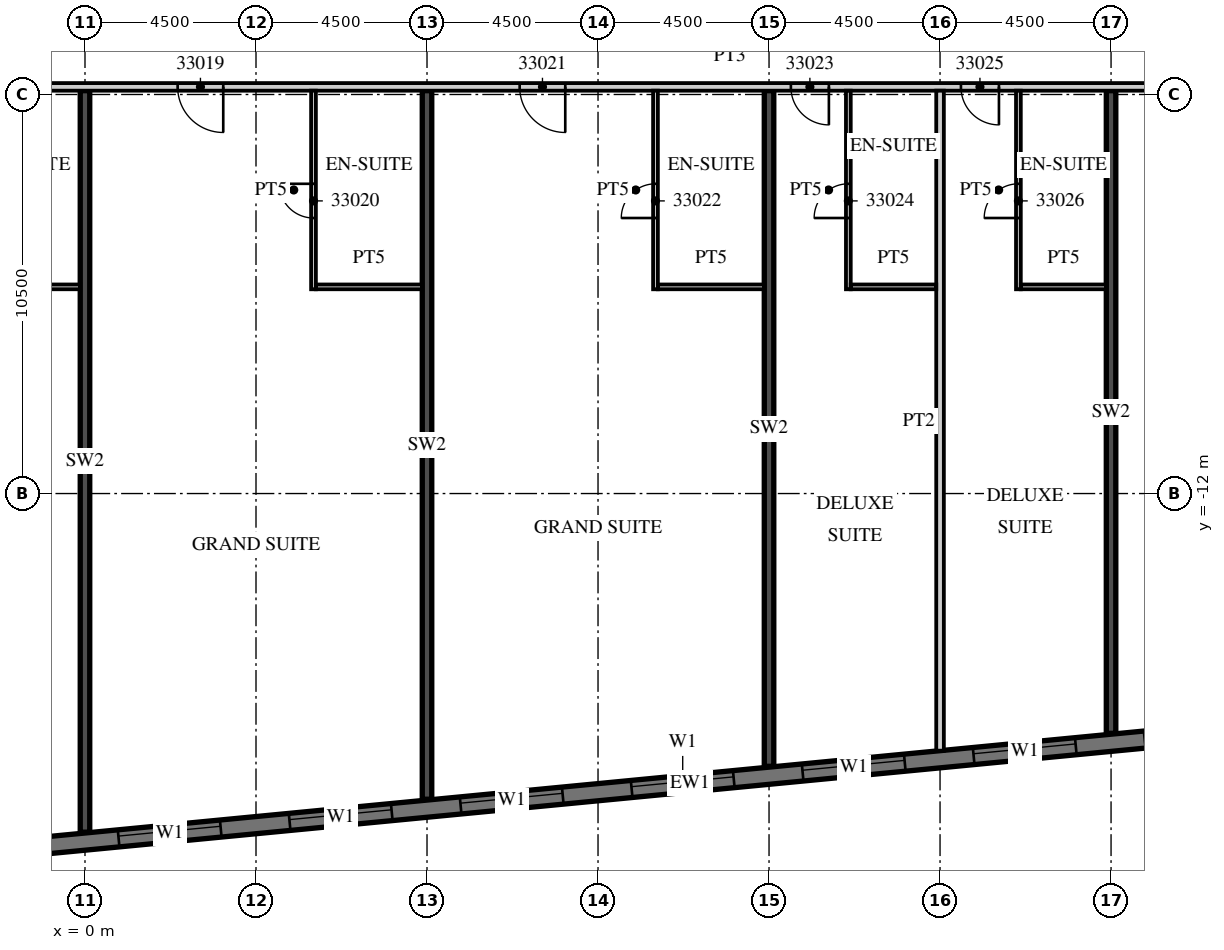
"""IFC4 building model, lengths in metres.
Left out: names, types, materials, properties, quantities, classifications, styles, units other than length and angle.
Written with IfcOpenShell. Run it as: python <this file> out.ifc"""

import sys

from ifc_helpers import new_model, si_unit, direction, frame, frame_2d, origin, place, context, subcontext, project, spatial, rectangle, extrude, element, fill, save


model = new_model("IFC4")
c1 = context("Model", 3, precision=1e-05, world=origin(), true_north=direction((0.0, 1.0)))
c2 = subcontext(c1, "Body", "Model", "MODEL_VIEW")
j1 = project(units=[si_unit("LENGTHUNIT", "METRE"), si_unit("PLANEANGLEUNIT", "RADIAN")], contexts=[c1])
p1 = place(None, origin())
s1 = spatial("IfcSite", under=j1, at=p1, CompositionType="ELEMENT")
p2 = place(p1, origin())
s2 = spatial("IfcBuilding", under=s1, at=p2, CompositionType="ELEMENT")
p3 = place(p2, frame((0.0, 0.0, 143.8)))
s3 = spatial("IfcBuildingStorey", under=s2, at=p3, CompositionType="ELEMENT", Elevation=143.8)
p4 = place(p3, frame((0.0, -20.91, 0.0), z_axis=(0.0, 0.0, 1.0), x_axis=(0.0, 1.0, 0.0)))
e1 = element("IfcWall", 1, at=p4, inside=s3, PredefinedType="SHEAR", context=c2, shape_type="SweptSolid", body=[
    extrude(rectangle(XDim=19.51, YDim=0.25, at=frame_2d((9.755, 0.0))), origin(), (0.0, 0.0, 1.0), 3.3),
])
p5 = place(p3, frame((9.0, -20.044, 0.0), z_axis=(0.0, 0.0, 1.0), x_axis=(0.0, 1.0, 0.0)))
e2 = element("IfcWall", 2, at=p5, inside=s3, PredefinedType="SHEAR", context=c2, shape_type="SweptSolid", body=[
    extrude(rectangle(XDim=18.644, YDim=0.25, at=frame_2d((9.322, 0.0))), origin(), (0.0, 0.0, 1.0), 3.3),
])
p6 = place(p3, frame((18.0, -19.177, 0.0), z_axis=(0.0, 0.0, 1.0), x_axis=(0.0, 1.0, 0.0)))
e3 = element("IfcWall", 3, at=p6, inside=s3, PredefinedType="SHEAR", context=c2, shape_type="SweptSolid", body=[
    extrude(rectangle(XDim=17.777, YDim=0.25, at=frame_2d((8.889, 0.0))), origin(), (0.0, 0.0, 1.0), 3.3),
])
p7 = place(p3, frame((27.0, -18.311, 0.0), z_axis=(0.0, 0.0, 1.0), x_axis=(0.0, 1.0, 0.0)))
e4 = element("IfcWall", 4, at=p7, inside=s3, PredefinedType="SHEAR", context=c2, shape_type="SweptSolid", body=[
    extrude(rectangle(XDim=16.911, YDim=0.25, at=frame_2d((8.455, 0.0))), origin(), (0.0, 0.0, 1.0), 3.3),
])
p8 = place(p3, frame((-13.521, -22.46, 0.0), z_axis=(0.0, 0.0, 1.0), x_axis=(0.995396096335, 0.095846812164, 0.0)))
e5 = element("IfcWall", 5, at=p8, inside=s3, PredefinedType="SOLIDWALL", context=c2, shape_type="SweptSolid", body=[
    extrude(rectangle(XDim=59.151, YDim=0.45, at=frame_2d((29.575, 0.0))), origin(), (0.0, 0.0, 1.0), 3.02),
])
p9 = place(p8, frame((0.91, 0.0, 0.45)))
e6 = element("IfcOpeningElement", 6, at=p9, cuts=e5, PredefinedType="OPENING", context=c2, shape_type="SweptSolid", body=[
    extrude(rectangle(XDim=2.7, YDim=2.25, at=frame_2d((1.35, 1.125))), frame((0.0, 0.235, 0.0), z_axis=(0.0, -1.0, 0.0), x_axis=(1.0, 0.0, 0.0)), (0.0, 0.0, 1.0), 0.47),
])
p10 = place(p8, frame((5.431, 0.0, 0.45)))
e7 = element("IfcOpeningElement", 7, at=p10, cuts=e5, PredefinedType="OPENING", context=c2, shape_type="SweptSolid", body=[
    extrude(rectangle(XDim=2.7, YDim=2.25, at=frame_2d((1.35, 1.125))), frame((0.0, 0.235, 0.0), z_axis=(0.0, -1.0, 0.0), x_axis=(1.0, 0.0, 0.0)), (0.0, 0.0, 1.0), 0.47),
])
p11 = place(p8, frame((9.952, 0.0, 0.45)))
e8 = element("IfcOpeningElement", 8, at=p11, cuts=e5, PredefinedType="OPENING", context=c2, shape_type="SweptSolid", body=[
    extrude(rectangle(XDim=2.7, YDim=2.25, at=frame_2d((1.35, 1.125))), frame((0.0, 0.235, 0.0), z_axis=(0.0, -1.0, 0.0), x_axis=(1.0, 0.0, 0.0)), (0.0, 0.0, 1.0), 0.47),
])
p12 = place(p8, frame((14.473, 0.0, 0.45)))
e9 = element("IfcOpeningElement", 9, at=p12, cuts=e5, PredefinedType="OPENING", context=c2, shape_type="SweptSolid", body=[
    extrude(rectangle(XDim=2.7, YDim=2.25, at=frame_2d((1.35, 1.125))), frame((0.0, 0.235, 0.0), z_axis=(0.0, -1.0, 0.0), x_axis=(1.0, 0.0, 0.0)), (0.0, 0.0, 1.0), 0.47),
])
p13 = place(p8, frame((18.994, 0.0, 0.45)))
e10 = element("IfcOpeningElement", 10, at=p13, cuts=e5, PredefinedType="OPENING", context=c2, shape_type="SweptSolid", body=[
    extrude(rectangle(XDim=2.7, YDim=2.25, at=frame_2d((1.35, 1.125))), frame((0.0, 0.235, 0.0), z_axis=(0.0, -1.0, 0.0), x_axis=(1.0, 0.0, 0.0)), (0.0, 0.0, 1.0), 0.47),
])
p14 = place(p8, frame((23.514, 0.0, 0.45)))
e11 = element("IfcOpeningElement", 11, at=p14, cuts=e5, PredefinedType="OPENING", context=c2, shape_type="SweptSolid", body=[
    extrude(rectangle(XDim=2.7, YDim=2.25, at=frame_2d((1.35, 1.125))), frame((0.0, 0.235, 0.0), z_axis=(0.0, -1.0, 0.0), x_axis=(1.0, 0.0, 0.0)), (0.0, 0.0, 1.0), 0.47),
])
p15 = place(p8, frame((28.035, 0.0, 0.45)))
e12 = element("IfcOpeningElement", 12, at=p15, cuts=e5, PredefinedType="OPENING", context=c2, shape_type="SweptSolid", body=[
    extrude(rectangle(XDim=2.7, YDim=2.25, at=frame_2d((1.35, 1.125))), frame((0.0, 0.235, 0.0), z_axis=(0.0, -1.0, 0.0), x_axis=(1.0, 0.0, 0.0)), (0.0, 0.0, 1.0), 0.47),
])
p16 = place(p8, frame((32.556, 0.0, 0.45)))
e13 = element("IfcOpeningElement", 13, at=p16, cuts=e5, PredefinedType="OPENING", context=c2, shape_type="SweptSolid", body=[
    extrude(rectangle(XDim=2.7, YDim=2.25, at=frame_2d((1.35, 1.125))), frame((0.0, 0.235, 0.0), z_axis=(0.0, -1.0, 0.0), x_axis=(1.0, 0.0, 0.0)), (0.0, 0.0, 1.0), 0.47),
])
p17 = place(p8, frame((37.077, 0.0, 0.45)))
e14 = element("IfcOpeningElement", 14, at=p17, cuts=e5, PredefinedType="OPENING", context=c2, shape_type="SweptSolid", body=[
    extrude(rectangle(XDim=2.7, YDim=2.25, at=frame_2d((1.35, 1.125))), frame((0.0, 0.235, 0.0), z_axis=(0.0, -1.0, 0.0), x_axis=(1.0, 0.0, 0.0)), (0.0, 0.0, 1.0), 0.47),
])
p18 = place(p8, frame((41.598, 0.0, 0.45)))
e15 = element("IfcOpeningElement", 15, at=p18, cuts=e5, PredefinedType="OPENING", context=c2, shape_type="SweptSolid", body=[
    extrude(rectangle(XDim=2.7, YDim=2.25, at=frame_2d((1.35, 1.125))), frame((0.0, 0.235, 0.0), z_axis=(0.0, -1.0, 0.0), x_axis=(1.0, 0.0, 0.0)), (0.0, 0.0, 1.0), 0.47),
])
p19 = place(p8, frame((46.118, 0.0, 0.45)))
e16 = element("IfcOpeningElement", 16, at=p19, cuts=e5, PredefinedType="OPENING", context=c2, shape_type="SweptSolid", body=[
    extrude(rectangle(XDim=2.7, YDim=2.25, at=frame_2d((1.35, 1.125))), frame((0.0, 0.235, 0.0), z_axis=(0.0, -1.0, 0.0), x_axis=(1.0, 0.0, 0.0)), (0.0, 0.0, 1.0), 0.47),
])
p20 = place(p8, frame((50.639, 0.0, 0.45)))
e17 = element("IfcOpeningElement", 17, at=p20, cuts=e5, PredefinedType="OPENING", context=c2, shape_type="SweptSolid", body=[
    extrude(rectangle(XDim=2.7, YDim=2.25, at=frame_2d((1.35, 1.125))), frame((0.0, 0.235, 0.0), z_axis=(0.0, -1.0, 0.0), x_axis=(1.0, 0.0, 0.0)), (0.0, 0.0, 1.0), 0.47),
])
p21 = place(p8, frame((55.15, 0.0, 0.45)))
e18 = element("IfcOpeningElement", 18, at=p21, cuts=e5, PredefinedType="OPENING", context=c2, shape_type="SweptSolid", body=[
    extrude(rectangle(XDim=2.7, YDim=2.25, at=frame_2d((1.35, 1.125))), frame((0.0, 0.235, 0.0), z_axis=(0.0, -1.0, 0.0), x_axis=(1.0, 0.0, 0.0)), (0.0, 0.0, 1.0), 0.47),
])
p22 = place(p3, frame((-13.5, -1.3, 0.0), z_axis=(0.0, 0.0, 1.0), x_axis=(1.0, 0.0, 0.0)))
e19 = element("IfcWall", 19, at=p22, inside=s3, PredefinedType="PARTITIONING", context=c2, shape_type="SweptSolid", body=[
    extrude(rectangle(XDim=60.932, YDim=0.2, at=frame_2d((30.466, 0.0))), origin(), (0.0, 0.0, 1.0), 3.02),
])
p23 = place(p22, frame((2.925, 0.0, 0.0)))
e20 = element("IfcOpeningElement", 20, at=p23, cuts=e19, PredefinedType="OPENING", context=c2, shape_type="SweptSolid", body=[
    extrude(rectangle(XDim=1.0, YDim=2.1, at=frame_2d((0.5, 1.05))), frame((0.0, 0.11, 0.0), z_axis=(0.0, -1.0, 0.0), x_axis=(1.0, 0.0, 0.0)), (0.0, 0.0, 1.0), 0.22),
])
p24 = place(p22, frame((6.938, 0.0, 0.0)))
e21 = element("IfcOpeningElement", 21, at=p24, cuts=e19, PredefinedType="OPENING", context=c2, shape_type="SweptSolid", body=[
    extrude(rectangle(XDim=1.2, YDim=2.1, at=frame_2d((0.6, 1.05))), frame((0.0, 0.11, 0.0), z_axis=(0.0, -1.0, 0.0), x_axis=(1.0, 0.0, 0.0)), (0.0, 0.0, 1.0), 0.22),
])
p25 = place(p22, frame((15.938, 0.0, 0.0)))
e22 = element("IfcOpeningElement", 22, at=p25, cuts=e19, PredefinedType="OPENING", context=c2, shape_type="SweptSolid", body=[
    extrude(rectangle(XDim=1.2, YDim=2.1, at=frame_2d((0.6, 1.05))), frame((0.0, 0.11, 0.0), z_axis=(0.0, -1.0, 0.0), x_axis=(1.0, 0.0, 0.0)), (0.0, 0.0, 1.0), 0.22),
])
p26 = place(p22, frame((24.938, 0.0, 0.0)))
e23 = element("IfcOpeningElement", 23, at=p26, cuts=e19, PredefinedType="OPENING", context=c2, shape_type="SweptSolid", body=[
    extrude(rectangle(XDim=1.2, YDim=2.1, at=frame_2d((0.6, 1.05))), frame((0.0, 0.11, 0.0), z_axis=(0.0, -1.0, 0.0), x_axis=(1.0, 0.0, 0.0)), (0.0, 0.0, 1.0), 0.22),
])
p27 = place(p22, frame((32.075, 0.0, 0.0)))
e24 = element("IfcOpeningElement", 24, at=p27, cuts=e19, PredefinedType="OPENING", context=c2, shape_type="SweptSolid", body=[
    extrude(rectangle(XDim=1.0, YDim=2.1, at=frame_2d((0.5, 1.05))), frame((0.0, 0.11, 0.0), z_axis=(0.0, -1.0, 0.0), x_axis=(1.0, 0.0, 0.0)), (0.0, 0.0, 1.0), 0.22),
])
p28 = place(p22, frame((36.55, 0.0, 0.0)))
e25 = element("IfcOpeningElement", 25, at=p28, cuts=e19, PredefinedType="OPENING", context=c2, shape_type="SweptSolid", body=[
    extrude(rectangle(XDim=1.0, YDim=2.1, at=frame_2d((0.5, 1.05))), frame((0.0, 0.11, 0.0), z_axis=(0.0, -1.0, 0.0), x_axis=(1.0, 0.0, 0.0)), (0.0, 0.0, 1.0), 0.22),
])
p29 = place(p22, frame((42.938, 0.0, 0.0)))
e26 = element("IfcOpeningElement", 26, at=p29, cuts=e19, PredefinedType="OPENING", context=c2, shape_type="SweptSolid", body=[
    extrude(rectangle(XDim=1.2, YDim=2.1, at=frame_2d((0.6, 1.05))), frame((0.0, 0.11, 0.0), z_axis=(0.0, -1.0, 0.0), x_axis=(1.0, 0.0, 0.0)), (0.0, 0.0, 1.0), 0.22),
])
p30 = place(p22, frame((52.425, 0.0, 0.0)))
e27 = element("IfcOpeningElement", 27, at=p30, cuts=e19, PredefinedType="OPENING", context=c2, shape_type="SweptSolid", body=[
    extrude(rectangle(XDim=1.0, YDim=2.1, at=frame_2d((0.5, 1.05))), frame((0.0, 0.11, 0.0), z_axis=(0.0, -1.0, 0.0), x_axis=(1.0, 0.0, 0.0)), (0.0, 0.0, 1.0), 0.22),
])
p31 = place(p22, frame((58.316, 0.0, 0.0)))
e28 = element("IfcOpeningElement", 28, at=p31, cuts=e19, PredefinedType="OPENING", context=c2, shape_type="SweptSolid", body=[
    extrude(rectangle(XDim=1.2, YDim=2.1, at=frame_2d((0.6, 1.05))), frame((0.0, 0.11, 0.0), z_axis=(0.0, -1.0, 0.0), x_axis=(1.0, 0.0, 0.0)), (0.0, 0.0, 1.0), 0.22),
])
p32 = place(p3, frame((-2.925, -6.562, 0.0), z_axis=(0.0, 0.0, 1.0), x_axis=(1.0, 0.0, 0.0)))
e29 = element("IfcWall", 29, at=p32, inside=s3, PredefinedType="PARTITIONING", context=c2, shape_type="SweptSolid", body=[
    extrude(rectangle(XDim=2.8, YDim=0.125, at=frame_2d((1.4, 0.0))), origin(), (0.0, 0.0, 1.0), 3.02),
])
p33 = place(p3, frame((6.013, -6.625, 0.0), z_axis=(0.0, 0.0, 1.0), x_axis=(0.0, 1.0, 0.0)))
e30 = element("IfcWall", 30, at=p33, inside=s3, PredefinedType="PARTITIONING", context=c2, shape_type="SweptSolid", body=[
    extrude(rectangle(XDim=5.225, YDim=0.125, at=frame_2d((2.613, 0.0))), origin(), (0.0, 0.0, 1.0), 3.02),
])
p34 = place(p33, frame((1.875, 0.0, 0.0)))
e31 = element("IfcOpeningElement", 31, at=p34, cuts=e30, PredefinedType="OPENING", context=c2, shape_type="SweptSolid", body=[
    extrude(rectangle(XDim=0.9, YDim=2.1, at=frame_2d((0.45, 1.05))), frame((0.0, 0.073, 0.0), z_axis=(0.0, -1.0, 0.0), x_axis=(1.0, 0.0, 0.0)), (0.0, 0.0, 1.0), 0.145),
])
p35 = place(p3, frame((6.075, -6.562, 0.0), z_axis=(0.0, 0.0, 1.0), x_axis=(1.0, 0.0, 0.0)))
e32 = element("IfcWall", 32, at=p35, inside=s3, PredefinedType="PARTITIONING", context=c2, shape_type="SweptSolid", body=[
    extrude(rectangle(XDim=2.8, YDim=0.125, at=frame_2d((1.4, 0.0))), origin(), (0.0, 0.0, 1.0), 3.02),
])
p36 = place(p3, frame((15.012, -6.625, 0.0), z_axis=(0.0, 0.0, 1.0), x_axis=(0.0, 1.0, 0.0)))
e33 = element("IfcWall", 33, at=p36, inside=s3, PredefinedType="PARTITIONING", context=c2, shape_type="SweptSolid", body=[
    extrude(rectangle(XDim=5.225, YDim=0.125, at=frame_2d((2.613, 0.0))), origin(), (0.0, 0.0, 1.0), 3.02),
])
p37 = place(p36, frame((1.875, 0.0, 0.0)))
e34 = element("IfcOpeningElement", 34, at=p37, cuts=e33, PredefinedType="OPENING", context=c2, shape_type="SweptSolid", body=[
    extrude(rectangle(XDim=0.9, YDim=2.1, at=frame_2d((0.45, 1.05))), frame((0.0, 0.073, 0.0), z_axis=(0.0, -1.0, 0.0), x_axis=(1.0, 0.0, 0.0)), (0.0, 0.0, 1.0), 0.145),
])
p38 = place(p3, frame((15.075, -6.562, 0.0), z_axis=(0.0, 0.0, 1.0), x_axis=(1.0, 0.0, 0.0)))
e35 = element("IfcWall", 35, at=p38, inside=s3, PredefinedType="PARTITIONING", context=c2, shape_type="SweptSolid", body=[
    extrude(rectangle(XDim=2.8, YDim=0.125, at=frame_2d((1.4, 0.0))), origin(), (0.0, 0.0, 1.0), 3.02),
])
p39 = place(p3, frame((22.5, -18.766, 0.0), z_axis=(0.0, 0.0, 1.0), x_axis=(0.0, 1.0, 0.0)))
e36 = element("IfcWall", 36, at=p39, inside=s3, PredefinedType="PARTITIONING", context=c2, shape_type="SweptSolid", body=[
    extrude(rectangle(XDim=17.366, YDim=0.2, at=frame_2d((8.683, 0.0))), origin(), (0.0, 0.0, 1.0), 3.02),
])
p40 = place(p3, frame((20.087, -6.625, 0.0), z_axis=(0.0, 0.0, 1.0), x_axis=(0.0, 1.0, 0.0)))
e37 = element("IfcWall", 37, at=p40, inside=s3, PredefinedType="PARTITIONING", context=c2, shape_type="SweptSolid", body=[
    extrude(rectangle(XDim=5.225, YDim=0.125, at=frame_2d((2.613, 0.0))), origin(), (0.0, 0.0, 1.0), 3.02),
])
p41 = place(p40, frame((1.875, 0.0, 0.0)))
e38 = element("IfcOpeningElement", 38, at=p41, cuts=e37, PredefinedType="OPENING", context=c2, shape_type="SweptSolid", body=[
    extrude(rectangle(XDim=0.9, YDim=2.1, at=frame_2d((0.45, 1.05))), frame((0.0, 0.073, 0.0), z_axis=(0.0, -1.0, 0.0), x_axis=(1.0, 0.0, 0.0)), (0.0, 0.0, 1.0), 0.145),
])
p42 = place(p3, frame((20.15, -6.562, 0.0), z_axis=(0.0, 0.0, 1.0), x_axis=(1.0, 0.0, 0.0)))
e39 = element("IfcWall", 39, at=p42, inside=s3, PredefinedType="PARTITIONING", context=c2, shape_type="SweptSolid", body=[
    extrude(rectangle(XDim=2.25, YDim=0.125, at=frame_2d((1.125, 0.0))), origin(), (0.0, 0.0, 1.0), 3.02),
])
p43 = place(p3, frame((24.562, -6.625, 0.0), z_axis=(0.0, 0.0, 1.0), x_axis=(0.0, 1.0, 0.0)))
e40 = element("IfcWall", 40, at=p43, inside=s3, PredefinedType="PARTITIONING", context=c2, shape_type="SweptSolid", body=[
    extrude(rectangle(XDim=5.225, YDim=0.125, at=frame_2d((2.613, 0.0))), origin(), (0.0, 0.0, 1.0), 3.02),
])
p44 = place(p43, frame((1.875, 0.0, 0.0)))
e41 = element("IfcOpeningElement", 41, at=p44, cuts=e40, PredefinedType="OPENING", context=c2, shape_type="SweptSolid", body=[
    extrude(rectangle(XDim=0.9, YDim=2.1, at=frame_2d((0.45, 1.05))), frame((0.0, 0.073, 0.0), z_axis=(0.0, -1.0, 0.0), x_axis=(1.0, 0.0, 0.0)), (0.0, 0.0, 1.0), 0.145),
])
p45 = place(p3, frame((24.625, -6.562, 0.0), z_axis=(0.0, 0.0, 1.0), x_axis=(1.0, 0.0, 0.0)))
e42 = element("IfcWall", 42, at=p45, inside=s3, PredefinedType="PARTITIONING", context=c2, shape_type="SweptSolid", body=[
    extrude(rectangle(XDim=2.25, YDim=0.125, at=frame_2d((1.125, 0.0))), origin(), (0.0, 0.0, 1.0), 3.02),
])
p46 = place(p12, origin())
e43 = element("IfcWindow", 43, at=p46, inside=s3, PartitioningType="SINGLE_PANEL", PredefinedType="WINDOW", context=c2, shape_type="SweptSolid", body=[
    extrude(rectangle(XDim=2.7, YDim=2.25, at=frame_2d((1.35, 1.125))), frame((0.0, 0.09, 0.0), z_axis=(0.0, -1.0, 0.0), x_axis=(1.0, 0.0, 0.0)), (0.0, 0.0, 1.0), 0.06),
])
fill(e9, e43)
p47 = place(p13, origin())
e44 = element("IfcWindow", 44, at=p47, inside=s3, PartitioningType="SINGLE_PANEL", PredefinedType="WINDOW", context=c2, shape_type="SweptSolid", body=[
    extrude(rectangle(XDim=2.7, YDim=2.25, at=frame_2d((1.35, 1.125))), frame((0.0, 0.09, 0.0), z_axis=(0.0, -1.0, 0.0), x_axis=(1.0, 0.0, 0.0)), (0.0, 0.0, 1.0), 0.06),
])
fill(e10, e44)
p48 = place(p14, origin())
e45 = element("IfcWindow", 45, at=p48, inside=s3, PartitioningType="SINGLE_PANEL", PredefinedType="WINDOW", context=c2, shape_type="SweptSolid", body=[
    extrude(rectangle(XDim=2.7, YDim=2.25, at=frame_2d((1.35, 1.125))), frame((0.0, 0.09, 0.0), z_axis=(0.0, -1.0, 0.0), x_axis=(1.0, 0.0, 0.0)), (0.0, 0.0, 1.0), 0.06),
])
fill(e11, e45)
p49 = place(p15, origin())
e46 = element("IfcWindow", 46, at=p49, inside=s3, PartitioningType="SINGLE_PANEL", PredefinedType="WINDOW", context=c2, shape_type="SweptSolid", body=[
    extrude(rectangle(XDim=2.7, YDim=2.25, at=frame_2d((1.35, 1.125))), frame((0.0, 0.09, 0.0), z_axis=(0.0, -1.0, 0.0), x_axis=(1.0, 0.0, 0.0)), (0.0, 0.0, 1.0), 0.06),
])
fill(e12, e46)
p50 = place(p16, origin())
e47 = element("IfcWindow", 47, at=p50, inside=s3, PartitioningType="SINGLE_PANEL", PredefinedType="WINDOW", context=c2, shape_type="SweptSolid", body=[
    extrude(rectangle(XDim=2.7, YDim=2.25, at=frame_2d((1.35, 1.125))), frame((0.0, 0.09, 0.0), z_axis=(0.0, -1.0, 0.0), x_axis=(1.0, 0.0, 0.0)), (0.0, 0.0, 1.0), 0.06),
])
fill(e13, e47)
p51 = place(p17, origin())
e48 = element("IfcWindow", 48, at=p51, inside=s3, PartitioningType="SINGLE_PANEL", PredefinedType="WINDOW", context=c2, shape_type="SweptSolid", body=[
    extrude(rectangle(XDim=2.7, YDim=2.25, at=frame_2d((1.35, 1.125))), frame((0.0, 0.09, 0.0), z_axis=(0.0, -1.0, 0.0), x_axis=(1.0, 0.0, 0.0)), (0.0, 0.0, 1.0), 0.06),
])
fill(e14, e48)
p52 = place(p25, origin())
e49 = element("IfcDoor", 49, at=p52, inside=s3, OperationType="SINGLE_SWING_RIGHT", PredefinedType="DOOR", context=c2, shape_type="SweptSolid", body=[
    extrude(rectangle(XDim=1.2, YDim=2.1, at=frame_2d((0.6, 1.05))), frame((0.0, 0.025, 0.0), z_axis=(0.0, -1.0, 0.0), x_axis=(1.0, 0.0, 0.0)), (0.0, 0.0, 1.0), 0.05),
])
fill(e22, e49)
p53 = place(p34, origin())
e50 = element("IfcDoor", 50, at=p53, inside=s3, OperationType="SINGLE_SWING_RIGHT", PredefinedType="DOOR", context=c2, shape_type="SweptSolid", body=[
    extrude(rectangle(XDim=0.9, YDim=2.1, at=frame_2d((0.45, 1.05))), frame((0.0, 0.025, 0.0), z_axis=(0.0, -1.0, 0.0), x_axis=(1.0, 0.0, 0.0)), (0.0, 0.0, 1.0), 0.05),
])
fill(e31, e50)
p54 = place(p26, origin())
e51 = element("IfcDoor", 51, at=p54, inside=s3, OperationType="SINGLE_SWING_RIGHT", PredefinedType="DOOR", context=c2, shape_type="SweptSolid", body=[
    extrude(rectangle(XDim=1.2, YDim=2.1, at=frame_2d((0.6, 1.05))), frame((0.0, 0.025, 0.0), z_axis=(0.0, -1.0, 0.0), x_axis=(1.0, 0.0, 0.0)), (0.0, 0.0, 1.0), 0.05),
])
fill(e23, e51)
p55 = place(p37, origin())
e52 = element("IfcDoor", 52, at=p55, inside=s3, OperationType="SINGLE_SWING_LEFT", PredefinedType="DOOR", context=c2, shape_type="SweptSolid", body=[
    extrude(rectangle(XDim=0.9, YDim=2.1, at=frame_2d((0.45, 1.05))), frame((0.0, 0.025, 0.0), z_axis=(0.0, -1.0, 0.0), x_axis=(1.0, 0.0, 0.0)), (0.0, 0.0, 1.0), 0.05),
])
fill(e34, e52)
p56 = place(p27, origin())
e53 = element("IfcDoor", 53, at=p56, inside=s3, OperationType="SINGLE_SWING_RIGHT", PredefinedType="DOOR", context=c2, shape_type="SweptSolid", body=[
    extrude(rectangle(XDim=1.0, YDim=2.1, at=frame_2d((0.5, 1.05))), frame((0.0, 0.025, 0.0), z_axis=(0.0, -1.0, 0.0), x_axis=(1.0, 0.0, 0.0)), (0.0, 0.0, 1.0), 0.05),
])
fill(e24, e53)
p57 = place(p41, origin())
e54 = element("IfcDoor", 54, at=p57, inside=s3, OperationType="SINGLE_SWING_LEFT", PredefinedType="DOOR", context=c2, shape_type="SweptSolid", body=[
    extrude(rectangle(XDim=0.9, YDim=2.1, at=frame_2d((0.45, 1.05))), frame((0.0, 0.025, 0.0), z_axis=(0.0, -1.0, 0.0), x_axis=(1.0, 0.0, 0.0)), (0.0, 0.0, 1.0), 0.05),
])
fill(e38, e54)
p58 = place(p28, origin())
e55 = element("IfcDoor", 55, at=p58, inside=s3, OperationType="SINGLE_SWING_RIGHT", PredefinedType="DOOR", context=c2, shape_type="SweptSolid", body=[
    extrude(rectangle(XDim=1.0, YDim=2.1, at=frame_2d((0.5, 1.05))), frame((0.0, 0.025, 0.0), z_axis=(0.0, -1.0, 0.0), x_axis=(1.0, 0.0, 0.0)), (0.0, 0.0, 1.0), 0.05),
])
fill(e25, e55)
p59 = place(p44, origin())
e56 = element("IfcDoor", 56, at=p59, inside=s3, OperationType="SINGLE_SWING_LEFT", PredefinedType="DOOR", context=c2, shape_type="SweptSolid", body=[
    extrude(rectangle(XDim=0.9, YDim=2.1, at=frame_2d((0.45, 1.05))), frame((0.0, 0.025, 0.0), z_axis=(0.0, -1.0, 0.0), x_axis=(1.0, 0.0, 0.0)), (0.0, 0.0, 1.0), 0.05),
])
fill(e41, e56)
save(model, sys.argv[1])
